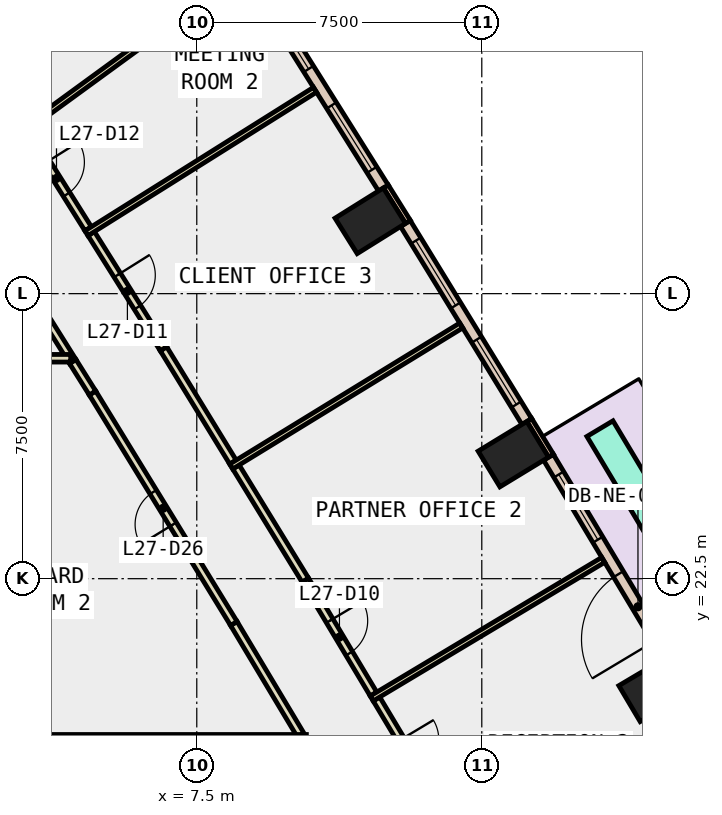
"""IFC4 building model, lengths in metres.
Left out: names, types, materials, properties, quantities, classifications, styles, units other than length and angle.
Written with IfcOpenShell. Run it as: python <this file> out.ifc"""

import sys

from ifc_helpers import new_model, si_unit, direction, frame, frame_2d, origin, origin_2d, place, context, subcontext, project, spatial, rectangle, extrude, element, fill, save


model = new_model("IFC4")
c1 = context("Model", 3, precision=1e-05, world=origin(), true_north=direction((0.0, 1.0)))
c2 = subcontext(c1, "Body", "Model", "MODEL_VIEW")
j1 = project(units=[si_unit("LENGTHUNIT", "METRE"), si_unit("PLANEANGLEUNIT", "RADIAN")], contexts=[c1])
p1 = place(None, origin())
s1 = spatial("IfcSite", under=j1, at=p1, CompositionType="ELEMENT")
p2 = place(p1, origin())
s2 = spatial("IfcBuilding", under=s1, at=p2, CompositionType="ELEMENT")
p3 = place(p2, frame((0.0, 0.0, 124.4)))
s3 = spatial("IfcBuildingStorey", under=s2, at=p3, CompositionType="ELEMENT", Elevation=124.4)
for number, where, z_axis, x_axis in (
    (1, (19.532, 19.595, -0.4), (0.0, 0.0, 1.0), (-0.51, 0.86, 0.0)),
    (2, (15.831, 25.776, -0.4), (0.0, 0.0, 1.0), (-0.52, 0.854, 0.0)),
    (3, (12.066, 31.917, -0.4), (0.0, 0.0, 1.0), (-0.53, 0.848, 0.0)),
):
    element("IfcColumn", number, at=place(p3, frame(where, z_axis=z_axis, x_axis=x_axis)), inside=s3, PredefinedType="COLUMN", context=c2, shape_type="SweptSolid", body=[
        extrude(rectangle(XDim=1.1, YDim=1.5, at=origin_2d()), origin(), (0.0, 0.0, 1.0), 4.2),
    ])
p4 = place(p3, frame((16.822, 25.735, 0.0), z_axis=(0.0, 0.0, 1.0), x_axis=(-0.519869515594, 0.854245682901, 0.0)))
e4 = element("IfcWall", 4, at=p4, inside=s3, PredefinedType="STANDARD", context=c2, shape_type="SweptSolid", body=[
    extrude(rectangle(XDim=1.1, YDim=0.15, at=frame_2d((0.55, 0.0))), origin(), (0.0, 0.0, 1.0), 3.8),
])
p5 = place(p3, frame((13.057, 31.888, 0.0), z_axis=(0.0, 0.0, 1.0), x_axis=(-0.529719642941, 0.848172800721, 0.0)))
e5 = element("IfcWall", 5, at=p5, inside=s3, PredefinedType="STANDARD", context=c2, shape_type="SweptSolid", body=[
    extrude(rectangle(XDim=1.1, YDim=0.15, at=frame_2d((0.55, 0.0))), origin(), (0.0, 0.0, 1.0), 3.8),
])
p6 = place(p3, frame((19.895, 20.449, 0.0), z_axis=(0.0, 0.0, 1.0), x_axis=(-0.513708729904, 0.857964650099, 0.0)))
e6 = element("IfcWall", 6, at=p6, inside=s3, PredefinedType="STANDARD", context=c2, shape_type="SweptSolid", body=[
    extrude(rectangle(XDim=6.115, YDim=0.3, at=frame_2d((3.057, 0.0))), origin(), (0.0, 0.0, 1.0), 3.8),
])
p7 = place(p6, frame((0.529, 0.0, 0.0)))
e7 = element("IfcOpeningElement", 7, at=p7, cuts=e6, PredefinedType="OPENING", context=c2, shape_type="SweptSolid", body=[
    extrude(rectangle(XDim=2.0, YDim=2.4, at=frame_2d((1.0, 1.2))), frame((0.0, 0.16, 0.0), z_axis=(0.0, -1.0, 0.0), x_axis=(1.0, 0.0, 0.0)), (0.0, 0.0, 1.0), 0.32),
])
p8 = place(p6, frame((3.586, 0.0, 0.9)))
e8 = element("IfcOpeningElement", 8, at=p8, cuts=e6, PredefinedType="OPENING", context=c2, shape_type="SweptSolid", body=[
    extrude(rectangle(XDim=2.0, YDim=2.6, at=frame_2d((1.0, 1.3))), frame((0.0, 0.16, 0.0), z_axis=(0.0, -1.0, 0.0), x_axis=(1.0, 0.0, 0.0)), (0.0, 0.0, 1.0), 0.32),
])
p9 = place(p3, frame((16.185, 26.634, 0.0), z_axis=(0.0, 0.0, 1.0), x_axis=(-0.522757750181, 0.8524812811, 0.0)))
e9 = element("IfcWall", 9, at=p9, inside=s3, PredefinedType="STANDARD", context=c2, shape_type="SweptSolid", body=[
    extrude(rectangle(XDim=6.114, YDim=0.3, at=frame_2d((3.057, 0.0))), origin(), (0.0, 0.0, 1.0), 3.8),
])
p10 = place(p9, frame((0.528, 0.0, 0.9)))
e10 = element("IfcOpeningElement", 10, at=p10, cuts=e9, PredefinedType="OPENING", context=c2, shape_type="SweptSolid", body=[
    extrude(rectangle(XDim=2.0, YDim=2.6, at=frame_2d((1.0, 1.3))), frame((0.0, 0.16, 0.0), z_axis=(0.0, -1.0, 0.0), x_axis=(1.0, 0.0, 0.0)), (0.0, 0.0, 1.0), 0.32),
])
p11 = place(p9, frame((3.585, 0.0, 0.9)))
e11 = element("IfcOpeningElement", 11, at=p11, cuts=e9, PredefinedType="OPENING", context=c2, shape_type="SweptSolid", body=[
    extrude(rectangle(XDim=2.0, YDim=2.6, at=frame_2d((1.0, 1.3))), frame((0.0, 0.16, 0.0), z_axis=(0.0, -1.0, 0.0), x_axis=(1.0, 0.0, 0.0)), (0.0, 0.0, 1.0), 0.32),
])
p12 = place(p3, frame((12.41, 32.779, 0.0), z_axis=(0.0, 0.0, 1.0), x_axis=(-0.53160564075, 0.846991996847, 0.0)))
e12 = element("IfcWall", 12, at=p12, inside=s3, PredefinedType="STANDARD", context=c2, shape_type="SweptSolid", body=[
    extrude(rectangle(XDim=6.266, YDim=0.3, at=frame_2d((3.133, 0.0))), origin(), (0.0, 0.0, 1.0), 3.8),
])
p13 = place(p12, frame((0.566, 0.0, 0.9)))
e13 = element("IfcOpeningElement", 13, at=p13, cuts=e12, PredefinedType="OPENING", context=c2, shape_type="SweptSolid", body=[
    extrude(rectangle(XDim=2.0, YDim=2.6, at=frame_2d((1.0, 1.3))), frame((0.0, 0.16, 0.0), z_axis=(0.0, -1.0, 0.0), x_axis=(1.0, 0.0, 0.0)), (0.0, 0.0, 1.0), 0.32),
])
p14 = place(p12, frame((3.699, 0.0, 0.9)))
e14 = element("IfcOpeningElement", 14, at=p14, cuts=e12, PredefinedType="OPENING", context=c2, shape_type="SweptSolid", body=[
    extrude(rectangle(XDim=2.0, YDim=2.6, at=frame_2d((1.0, 1.3))), frame((0.0, 0.16, 0.0), z_axis=(0.0, -1.0, 0.0), x_axis=(1.0, 0.0, 0.0)), (0.0, 0.0, 1.0), 0.32),
])
p15 = place(p3, frame((21.199, 21.288, 0.0), z_axis=(0.0, 0.0, 1.0), x_axis=(-0.513779237715, 0.857922429415, 0.0)))
e15 = element("IfcWall", 15, at=p15, inside=s3, PredefinedType="STANDARD", context=c2, shape_type="SweptSolid", body=[
    extrude(rectangle(XDim=6.014, YDim=0.8, at=frame_2d((3.007, 0.0))), origin(), (0.0, 0.0, 1.0), 0.8),
])
p16 = place(p3, frame((10.232, 18.386, 0.0), z_axis=(0.0, 0.0, 1.0), x_axis=(-0.513592824646, 0.858034038062, 0.0)))
e16 = element("IfcWall", 16, at=p16, inside=s3, PredefinedType="PARTITIONING", context=c2, shape_type="SweptSolid", body=[
    extrude(rectangle(XDim=3.421, YDim=0.2, at=frame_2d((1.71, 0.0))), origin(), (0.0, 0.0, 1.0), 3.8),
])
p17 = place(p3, frame((8.475, 21.321, 0.0), z_axis=(0.0, 0.0, 1.0), x_axis=(-0.522743103274, 0.852490262689, 0.0)))
e17 = element("IfcWall", 17, at=p17, inside=s3, PredefinedType="PARTITIONING", context=c2, shape_type="SweptSolid", body=[
    extrude(rectangle(XDim=7.115, YDim=0.2, at=frame_2d((3.557, 0.0))), origin(), (0.0, 0.0, 1.0), 3.8),
])
p18 = place(p17, frame((3.057, 0.0, 0.0)))
e18 = element("IfcOpeningElement", 18, at=p18, cuts=e17, PredefinedType="OPENING", context=c2, shape_type="SweptSolid", body=[
    extrude(rectangle(XDim=1.0, YDim=2.1, at=frame_2d((0.5, 1.05))), frame((0.0, 0.11, 0.0), z_axis=(0.0, -1.0, 0.0), x_axis=(1.0, 0.0, 0.0)), (0.0, 0.0, 1.0), 0.22),
])
p19 = place(p3, frame((4.756, 27.386, 0.0), z_axis=(0.0, 0.0, 1.0), x_axis=(-0.531343659666, 0.84715637006, 0.0)))
e19 = element("IfcWall", 19, at=p19, inside=s3, PredefinedType="PARTITIONING", context=c2, shape_type="SweptSolid", body=[
    extrude(rectangle(XDim=0.979, YDim=0.2, at=frame_2d((0.489, 0.0))), origin(), (0.0, 0.0, 1.0), 3.8),
])
p20 = place(p3, frame((4.236, 28.215, 0.0), z_axis=(0.0, 0.0, 1.0), x_axis=(-0.531602694807, 0.84699384583, 0.0)))
e20 = element("IfcWall", 20, at=p20, inside=s3, PredefinedType="PARTITIONING", context=c2, shape_type="SweptSolid", body=[
    extrude(rectangle(XDim=4.923, YDim=0.2, at=frame_2d((2.461, 0.0))), origin(), (0.0, 0.0, 1.0), 3.8),
])
p21 = place(p20, frame((1.961, 0.0, 0.0)))
e21 = element("IfcOpeningElement", 21, at=p21, cuts=e20, PredefinedType="OPENING", context=c2, shape_type="SweptSolid", body=[
    extrude(rectangle(XDim=1.0, YDim=2.1, at=frame_2d((0.5, 1.05))), frame((0.0, 0.11, 0.0), z_axis=(0.0, -1.0, 0.0), x_axis=(1.0, 0.0, 0.0)), (0.0, 0.0, 1.0), 0.22),
])
p22 = place(p3, frame((12.228, 19.335, 0.0), z_axis=(0.0, 0.0, 1.0), x_axis=(0.513796731551, -0.857911952736, 0.0)))
e22 = element("IfcWall", 22, at=p22, inside=s3, PredefinedType="PARTITIONING", context=c2, shape_type="SweptSolid", body=[
    extrude(rectangle(XDim=3.493, YDim=0.2, at=frame_2d((1.747, 0.0))), origin(), (0.0, 0.0, 1.0), 3.8),
])
p23 = place(p22, frame((1.247, 0.0, 0.0)))
e23 = element("IfcOpeningElement", 23, at=p23, cuts=e22, PredefinedType="OPENING", context=c2, shape_type="SweptSolid", body=[
    extrude(rectangle(XDim=1.0, YDim=2.1, at=frame_2d((0.5, 1.05))), frame((0.0, 0.11, 0.0), z_axis=(0.0, -1.0, 0.0), x_axis=(1.0, 0.0, 0.0)), (0.0, 0.0, 1.0), 0.22),
])
p24 = place(p3, frame((8.531, 25.439, 0.0), z_axis=(0.0, 0.0, 1.0), x_axis=(0.522704631836, -0.852513852003, 0.0)))
e24 = element("IfcWall", 24, at=p24, inside=s3, PredefinedType="PARTITIONING", context=c2, shape_type="SweptSolid", body=[
    extrude(rectangle(XDim=3.493, YDim=0.2, at=frame_2d((1.747, 0.0))), origin(), (0.0, 0.0, 1.0), 3.8),
])
p25 = place(p3, frame((10.357, 22.461, 0.0), z_axis=(0.0, 0.0, 1.0), x_axis=(0.513467759888, -0.858108885606, 0.0)))
e25 = element("IfcWall", 25, at=p25, inside=s3, PredefinedType="PARTITIONING", context=c2, shape_type="SweptSolid", body=[
    extrude(rectangle(XDim=3.494, YDim=0.2, at=frame_2d((1.747, 0.0))), origin(), (0.0, 0.0, 1.0), 3.8),
])
p26 = place(p25, frame((1.247, 0.0, 0.0)))
e26 = element("IfcOpeningElement", 26, at=p26, cuts=e25, PredefinedType="OPENING", context=c2, shape_type="SweptSolid", body=[
    extrude(rectangle(XDim=1.0, YDim=2.1, at=frame_2d((0.5, 1.05))), frame((0.0, 0.11, 0.0), z_axis=(0.0, -1.0, 0.0), x_axis=(1.0, 0.0, 0.0)), (0.0, 0.0, 1.0), 0.22),
])
p27 = place(p3, frame((4.722, 31.579, 0.0), z_axis=(0.0, 0.0, 1.0), x_axis=(0.531664655861, -0.846954953766, 0.0)))
e27 = element("IfcWall", 27, at=p27, inside=s3, PredefinedType="PARTITIONING", context=c2, shape_type="SweptSolid", body=[
    extrude(rectangle(XDim=3.581, YDim=0.2, at=frame_2d((1.791, 0.0))), origin(), (0.0, 0.0, 1.0), 3.8),
])
p28 = place(p27, frame((1.291, 0.0, 0.0)))
e28 = element("IfcOpeningElement", 28, at=p28, cuts=e27, PredefinedType="OPENING", context=c2, shape_type="SweptSolid", body=[
    extrude(rectangle(XDim=1.0, YDim=2.1, at=frame_2d((0.5, 1.05))), frame((0.0, 0.11, 0.0), z_axis=(0.0, -1.0, 0.0), x_axis=(1.0, 0.0, 0.0)), (0.0, 0.0, 1.0), 0.22),
])
p29 = place(p3, frame((6.626, 28.546, 0.0), z_axis=(0.0, 0.0, 1.0), x_axis=(0.522580081027, -0.852590205734, 0.0)))
e29 = element("IfcWall", 29, at=p29, inside=s3, PredefinedType="PARTITIONING", context=c2, shape_type="SweptSolid", body=[
    extrude(rectangle(XDim=3.494, YDim=0.2, at=frame_2d((1.747, 0.0))), origin(), (0.0, 0.0, 1.0), 3.8),
])
p30 = place(p3, frame((2.975, 34.361, 0.0), z_axis=(0.0, 0.0, 1.0), x_axis=(0.531740854333, -0.846907116414, 0.0)))
e30 = element("IfcWall", 30, at=p30, inside=s3, PredefinedType="PARTITIONING", context=c2, shape_type="SweptSolid", body=[
    extrude(rectangle(XDim=3.135, YDim=0.2, at=frame_2d((1.567, 0.0))), origin(), (0.0, 0.0, 1.0), 3.8),
])
p31 = place(p30, frame((1.068, 0.0, 0.0)))
e31 = element("IfcOpeningElement", 31, at=p31, cuts=e30, PredefinedType="OPENING", context=c2, shape_type="SweptSolid", body=[
    extrude(rectangle(XDim=1.0, YDim=2.1, at=frame_2d((0.5, 1.05))), frame((0.0, 0.11, 0.0), z_axis=(0.0, -1.0, 0.0), x_axis=(1.0, 0.0, 0.0)), (0.0, 0.0, 1.0), 0.22),
])
p32 = place(p3, frame((0.4, 18.3, 0.0), z_axis=(0.0, 0.0, 1.0), x_axis=(1.0, 0.0, 0.0)))
e32 = element("IfcWall", 32, at=p32, inside=s3, PredefinedType="PARTITIONING", context=c2, shape_type="SweptSolid", body=[
    extrude(rectangle(XDim=9.984, YDim=0.2, at=frame_2d((4.992, 0.0))), origin(), (0.0, 0.0, 1.0), 3.8),
])
p33 = place(p3, frame((-0.05, 28.3, 0.0), z_axis=(0.0, 0.0, 1.0), x_axis=(1.0, 0.0, 0.0)))
e33 = element("IfcWall", 33, at=p33, inside=s3, PredefinedType="PARTITIONING", context=c2, shape_type="SweptSolid", body=[
    extrude(rectangle(XDim=4.232, YDim=0.2, at=frame_2d((2.116, 0.0))), origin(), (0.0, 0.0, 1.0), 3.8),
])
p34 = place(p3, frame((12.104, 19.348, 0.0), z_axis=(0.0, 0.0, 1.0), x_axis=(0.85799008499, 0.513666247732, 0.0)))
e34 = element("IfcWall", 34, at=p34, inside=s3, PredefinedType="PARTITIONING", context=c2, shape_type="SweptSolid", body=[
    extrude(rectangle(XDim=7.1, YDim=0.15, at=frame_2d((3.55, 0.0))), origin(), (0.0, 0.0, 1.0), 3.8),
])
p35 = place(p3, frame((8.406, 25.451, 0.0), z_axis=(0.0, 0.0, 1.0), x_axis=(0.852520194289, 0.522694287637, 0.0)))
e35 = element("IfcWall", 35, at=p35, inside=s3, PredefinedType="PARTITIONING", context=c2, shape_type="SweptSolid", body=[
    extrude(rectangle(XDim=7.1, YDim=0.15, at=frame_2d((3.55, 0.0))), origin(), (0.0, 0.0, 1.0), 3.8),
])
p36 = place(p3, frame((4.597, 31.589, 0.0), z_axis=(0.0, 0.0, 1.0), x_axis=(0.846980720953, 0.531623605885, 0.0)))
e36 = element("IfcWall", 36, at=p36, inside=s3, PredefinedType="PARTITIONING", context=c2, shape_type="SweptSolid", body=[
    extrude(rectangle(XDim=7.101, YDim=0.15, at=frame_2d((3.55, 0.0))), origin(), (0.0, 0.0, 1.0), 3.8),
])
p37 = place(p3, frame((2.908, 34.281, 0.0), z_axis=(0.0, 0.0, 1.0), x_axis=(0.807935867, 0.589270425879, 0.0)))
e37 = element("IfcWall", 37, at=p37, inside=s3, PredefinedType="PARTITIONING", context=c2, shape_type="SweptSolid", body=[
    extrude(rectangle(XDim=5.744, YDim=0.15, at=frame_2d((2.872, 0.0))), origin(), (0.0, 0.0, 1.0), 3.8),
])
p38 = place(p7, origin())
e38 = element("IfcDoor", 38, at=p38, inside=s3, OperationType="SLIDING_TO_LEFT", PredefinedType="DOOR", context=c2, shape_type="SweptSolid", body=[
    extrude(rectangle(XDim=2.0, YDim=2.4, at=frame_2d((1.0, 1.2))), frame((0.0, 0.025, 0.0), z_axis=(0.0, -1.0, 0.0), x_axis=(1.0, 0.0, 0.0)), (0.0, 0.0, 1.0), 0.05),
])
fill(e7, e38)
p39 = place(p8, origin())
e39 = element("IfcWindow", 39, at=p39, inside=s3, PartitioningType="SINGLE_PANEL", PredefinedType="WINDOW", context=c2, shape_type="SweptSolid", body=[
    extrude(rectangle(XDim=2.0, YDim=2.6, at=frame_2d((1.0, 1.3))), frame((0.0, 0.03, 0.0), z_axis=(0.0, -1.0, 0.0), x_axis=(1.0, 0.0, 0.0)), (0.0, 0.0, 1.0), 0.06),
])
fill(e8, e39)
p40 = place(p10, origin())
e40 = element("IfcWindow", 40, at=p40, inside=s3, PartitioningType="SINGLE_PANEL", PredefinedType="WINDOW", context=c2, shape_type="SweptSolid", body=[
    extrude(rectangle(XDim=2.0, YDim=2.6, at=frame_2d((1.0, 1.3))), frame((0.0, 0.03, 0.0), z_axis=(0.0, -1.0, 0.0), x_axis=(1.0, 0.0, 0.0)), (0.0, 0.0, 1.0), 0.06),
])
fill(e10, e40)
p41 = place(p11, origin())
e41 = element("IfcWindow", 41, at=p41, inside=s3, PartitioningType="SINGLE_PANEL", PredefinedType="WINDOW", context=c2, shape_type="SweptSolid", body=[
    extrude(rectangle(XDim=2.0, YDim=2.6, at=frame_2d((1.0, 1.3))), frame((0.0, 0.03, 0.0), z_axis=(0.0, -1.0, 0.0), x_axis=(1.0, 0.0, 0.0)), (0.0, 0.0, 1.0), 0.06),
])
fill(e11, e41)
p42 = place(p13, origin())
e42 = element("IfcWindow", 42, at=p42, inside=s3, PartitioningType="SINGLE_PANEL", PredefinedType="WINDOW", context=c2, shape_type="SweptSolid", body=[
    extrude(rectangle(XDim=2.0, YDim=2.6, at=frame_2d((1.0, 1.3))), frame((0.0, 0.03, 0.0), z_axis=(0.0, -1.0, 0.0), x_axis=(1.0, 0.0, 0.0)), (0.0, 0.0, 1.0), 0.06),
])
fill(e13, e42)
p43 = place(p14, origin())
e43 = element("IfcWindow", 43, at=p43, inside=s3, PartitioningType="SINGLE_PANEL", PredefinedType="WINDOW", context=c2, shape_type="SweptSolid", body=[
    extrude(rectangle(XDim=2.0, YDim=2.6, at=frame_2d((1.0, 1.3))), frame((0.0, 0.03, 0.0), z_axis=(0.0, -1.0, 0.0), x_axis=(1.0, 0.0, 0.0)), (0.0, 0.0, 1.0), 0.06),
])
fill(e14, e43)
p44 = place(p26, origin())
e44 = element("IfcDoor", 44, at=p44, inside=s3, OperationType="SINGLE_SWING_RIGHT", PredefinedType="DOOR", context=c2, shape_type="SweptSolid", body=[
    extrude(rectangle(XDim=1.0, YDim=2.1, at=frame_2d((0.5, 1.05))), frame((0.0, 0.025, 0.0), z_axis=(0.0, -1.0, 0.0), x_axis=(1.0, 0.0, 0.0)), (0.0, 0.0, 1.0), 0.05),
])
fill(e26, e44)
p45 = place(p28, origin())
e45 = element("IfcDoor", 45, at=p45, inside=s3, OperationType="SINGLE_SWING_LEFT", PredefinedType="DOOR", context=c2, shape_type="SweptSolid", body=[
    extrude(rectangle(XDim=1.0, YDim=2.1, at=frame_2d((0.5, 1.05))), frame((0.0, 0.025, 0.0), z_axis=(0.0, -1.0, 0.0), x_axis=(1.0, 0.0, 0.0)), (0.0, 0.0, 1.0), 0.05),
])
fill(e28, e45)
p46 = place(p31, origin())
e46 = element("IfcDoor", 46, at=p46, inside=s3, OperationType="SINGLE_SWING_LEFT", PredefinedType="DOOR", context=c2, shape_type="SweptSolid", body=[
    extrude(rectangle(XDim=1.0, YDim=2.1, at=frame_2d((0.5, 1.05))), frame((0.0, 0.025, 0.0), z_axis=(0.0, -1.0, 0.0), x_axis=(1.0, 0.0, 0.0)), (0.0, 0.0, 1.0), 0.05),
])
fill(e31, e46)
p47 = place(p18, origin())
e47 = element("IfcDoor", 47, at=p47, inside=s3, OperationType="SINGLE_SWING_RIGHT", PredefinedType="DOOR", context=c2, shape_type="SweptSolid", body=[
    extrude(rectangle(XDim=1.0, YDim=2.1, at=frame_2d((0.5, 1.05))), frame((0.0, 0.025, 0.0), z_axis=(0.0, -1.0, 0.0), x_axis=(1.0, 0.0, 0.0)), (0.0, 0.0, 1.0), 0.05),
])
fill(e18, e47)
save(model, sys.argv[1])
